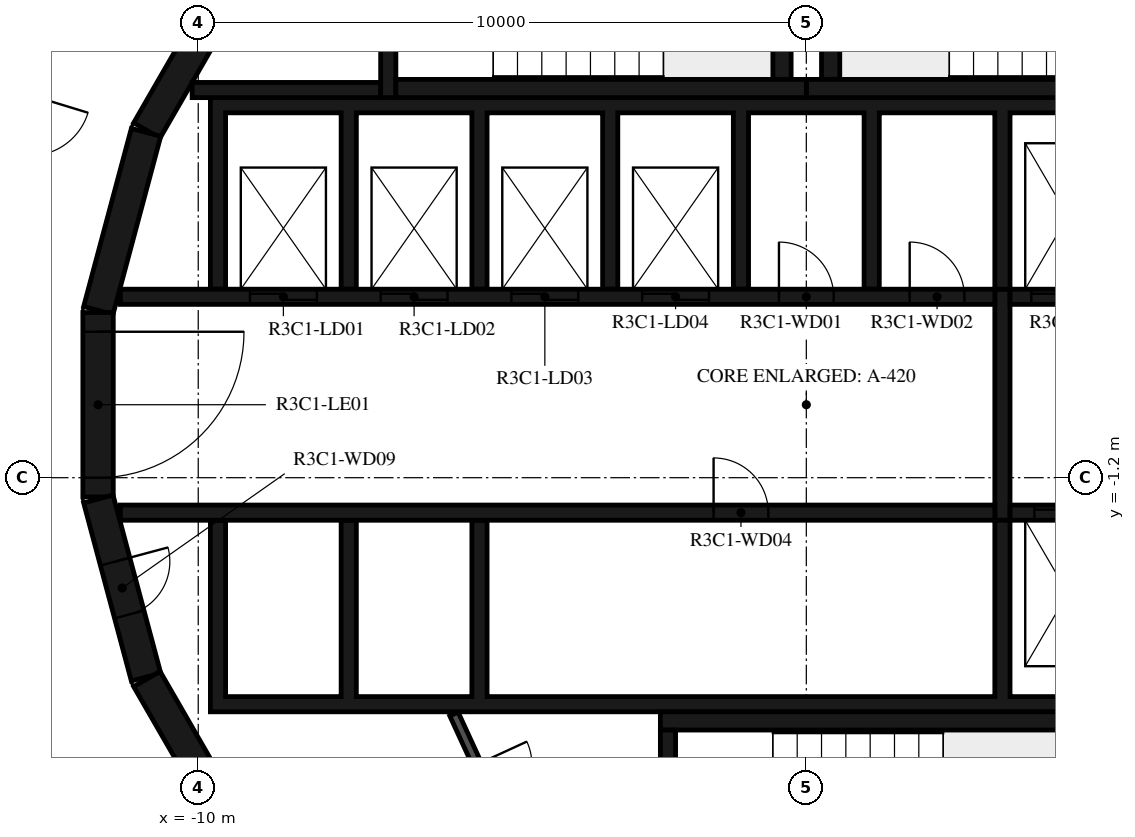
"""IFC4 building model, lengths in metres.
Left out: names, types, materials, properties, quantities, classifications, styles, units other than length and angle.
Written with IfcOpenShell. Run it as: python <this file> out.ifc"""

import sys

from ifc_helpers import new_model, si_unit, direction, frame, frame_2d, origin, place, context, subcontext, project, spatial, polyline, rectangle, outline, extrude, element, fill, save


model = new_model("IFC4")
c1 = context("Model", 3, precision=1e-05, world=origin(), true_north=direction((0.0, 1.0)))
c2 = subcontext(c1, "Body", "Model", "MODEL_VIEW")
j1 = project(units=[si_unit("LENGTHUNIT", "METRE"), si_unit("PLANEANGLEUNIT", "RADIAN")], contexts=[c1])
p1 = place(None, origin())
s1 = spatial("IfcSite", under=j1, at=p1, CompositionType="ELEMENT")
p2 = place(p1, origin())
s2 = spatial("IfcBuilding", under=s1, at=p2, CompositionType="ELEMENT")
p3 = place(p2, frame((0.0, 0.0, 137.9)))
s3 = spatial("IfcBuildingStorey", under=s2, at=p3, CompositionType="ELEMENT", Elevation=137.9)
for number, where, z_axis, x_axis in (
    (1, (-9.329, 7.137, 0.0), (0.0, 0.0, 1.0), (-0.5, -0.866, 0.0)),
    (2, (-10.858, 4.479, 0.0), (0.0, 0.0, 1.0), (-0.259, -0.966, 0.0)),
):
    element("IfcWall", number, at=place(p3, frame(where, z_axis=z_axis, x_axis=x_axis)), inside=s3, PredefinedType="SHEAR", context=c2, shape_type="SweptSolid", body=[
        extrude(rectangle(XDim=3.033, YDim=0.5, at=frame_2d((1.516, 0.0))), origin(), (0.0, 0.0, 1.0), 3.12),
    ])
p4 = place(p3, frame((-11.647, 1.516, 0.0), z_axis=(0.0, 0.0, 1.0), x_axis=(0.0, -1.0, 0.0)))
e3 = element("IfcWall", 3, at=p4, inside=s3, PredefinedType="SHEAR", context=c2, shape_type="SweptSolid", body=[
    extrude(rectangle(XDim=3.033, YDim=0.5, at=frame_2d((1.516, 0.0))), origin(), (0.0, 0.0, 1.0), 3.12),
])
p5 = place(p4, frame((0.316, 0.0, 0.0)))
e4 = element("IfcOpeningElement", 4, at=p5, cuts=e3, PredefinedType="OPENING", context=c2, shape_type="SweptSolid", body=[
    extrude(rectangle(XDim=2.4, YDim=2.1, at=frame_2d((1.2, 1.05))), frame((0.0, 0.26, 0.0), z_axis=(0.0, -1.0, 0.0), x_axis=(1.0, 0.0, 0.0)), (0.0, 0.0, 1.0), 0.52),
])
p6 = place(p3, frame((-11.643, -1.55, 0.0), z_axis=(0.0, 0.0, 1.0), x_axis=(0.258734743916, -0.965948410781, 0.0)))
e5 = element("IfcWall", 5, at=p6, inside=s3, PredefinedType="SHEAR", context=c2, shape_type="SweptSolid", body=[
    extrude(rectangle(XDim=3.033, YDim=0.5, at=frame_2d((1.516, 0.0))), origin(), (0.0, 0.0, 1.0), 3.12),
])
p7 = place(p6, frame((1.066, 0.0, 0.0)))
e6 = element("IfcOpeningElement", 6, at=p7, cuts=e5, PredefinedType="OPENING", context=c2, shape_type="SweptSolid", body=[
    extrude(rectangle(XDim=0.9, YDim=2.1, at=frame_2d((0.45, 1.05))), frame((0.0, 0.26, 0.0), z_axis=(0.0, -1.0, 0.0), x_axis=(1.0, 0.0, 0.0)), (0.0, 0.0, 1.0), 0.52),
])
p8 = place(p3, frame((-10.845, -4.51, 0.0), z_axis=(0.0, 0.0, 1.0), x_axis=(0.500087131594, -0.865975092491, 0.0)))
e7 = element("IfcWall", 7, at=p8, inside=s3, PredefinedType="SHEAR", context=c2, shape_type="SweptSolid", body=[
    extrude(rectangle(XDim=3.033, YDim=0.5, at=frame_2d((1.516, 0.0))), origin(), (0.0, 0.0, 1.0), 3.12),
])
p9 = place(p3, frame((0.0, 5.2, 0.0), z_axis=(0.0, 0.0, 1.0), x_axis=(1.0, 0.0, 0.0)))
e8 = element("IfcWall", 8, at=p9, inside=s3, PredefinedType="SHEAR", context=c2, shape_type="SweptSolid", body=[
    extrude(rectangle(XDim=6.75, YDim=0.3, at=frame_2d((3.375, 0.0))), origin(), (0.0, 0.0, 1.0), 3.12),
])
p10 = place(p3, frame((0.4, 5.35, 0.0), z_axis=(0.0, 0.0, 1.0), x_axis=(0.0, 1.0, 0.0)))
e9 = element("IfcWall", 9, at=p10, inside=s3, PredefinedType="SHEAR", context=c2, shape_type="SweptSolid", body=[
    extrude(rectangle(XDim=3.32, YDim=0.3, at=frame_2d((1.66, 0.0))), origin(), (0.0, 0.0, 1.0), 3.12),
])
p11 = place(p3, frame((-6.75, 5.2, 0.0), z_axis=(0.0, 0.0, 1.0), x_axis=(1.0, 0.0, 0.0)))
e10 = element("IfcWall", 10, at=p11, inside=s3, PredefinedType="SHEAR", context=c2, shape_type="SweptSolid", body=[
    extrude(rectangle(XDim=6.75, YDim=0.3, at=frame_2d((3.375, 0.0))), origin(), (0.0, 0.0, 1.0), 3.12),
])
p12 = place(p3, frame((-0.4, 5.35, 0.0), z_axis=(0.0, 0.0, 1.0), x_axis=(0.0, 1.0, 0.0)))
e11 = element("IfcWall", 11, at=p12, inside=s3, PredefinedType="SHEAR", context=c2, shape_type="SweptSolid", body=[
    extrude(rectangle(XDim=3.32, YDim=0.3, at=frame_2d((1.66, 0.0))), origin(), (0.0, 0.0, 1.0), 3.12),
])
p13 = place(p3, frame((-6.875, 8.97, 0.0), z_axis=(0.0, 0.0, 1.0), x_axis=(0.0, -1.0, 0.0)))
e12 = element("IfcWall", 12, at=p13, inside=s3, PredefinedType="SHEAR", context=c2, shape_type="SweptSolid", body=[
    extrude(rectangle(XDim=3.92, YDim=0.25, at=frame_2d((1.96, 0.0))), origin(), (0.0, 0.0, 1.0), 3.12),
])
p14 = place(p13, frame((1.61, 0.0, 0.0)))
e13 = element("IfcOpeningElement", 13, at=p14, cuts=e12, PredefinedType="OPENING", context=c2, shape_type="SweptSolid", body=[
    extrude(rectangle(XDim=1.2, YDim=2.1, at=frame_2d((0.6, 1.05))), frame((0.0, 0.135, 0.0), z_axis=(0.0, -1.0, 0.0), x_axis=(1.0, 0.0, 0.0)), (0.0, 0.0, 1.0), 0.27),
])
p15 = place(p3, frame((-7.0, 5.175, 0.0), z_axis=(0.0, 0.0, 1.0), x_axis=(-1.0, 0.0, 0.0)))
e14 = element("IfcWall", 14, at=p15, inside=s3, PredefinedType="SHEAR", context=c2, shape_type="SweptSolid", body=[
    extrude(rectangle(XDim=3.1, YDim=0.25, at=frame_2d((1.55, 0.0))), origin(), (0.0, 0.0, 1.0), 3.12),
])
p16 = place(p3, frame((-2.275, -8.67, 0.0), z_axis=(0.0, 0.0, 1.0), x_axis=(0.0, 1.0, 0.0)))
e15 = element("IfcWall", 15, at=p16, inside=s3, PredefinedType="SHEAR", context=c2, shape_type="SweptSolid", body=[
    extrude(rectangle(XDim=3.32, YDim=0.25, at=frame_2d((1.66, 0.0))), origin(), (0.0, 0.0, 1.0), 3.12),
])
p17 = place(p3, frame((-2.4, -5.2, 0.0), z_axis=(0.0, 0.0, 1.0), x_axis=(1.0, 0.0, 0.0)))
e16 = element("IfcWall", 16, at=p17, inside=s3, PredefinedType="SHEAR", context=c2, shape_type="SweptSolid", body=[
    extrude(rectangle(XDim=7.05, YDim=0.3, at=frame_2d((3.525, 0.0))), origin(), (0.0, 0.0, 1.0), 3.12),
])
p18 = place(p3, origin())
e17 = element("IfcWall", 17, at=p18, inside=s3, PredefinedType="SHEAR", context=c2, shape_type="SweptSolid", body=[
    extrude(outline(polyline([(-9.55, 4.8), (-7.65, 4.8), (-7.65, 1.9), (-7.4, 1.9), (-7.4, 4.8), (-5.5, 4.8), (-5.5, 1.9), (-5.25, 1.9), (-5.25, 4.8), (-3.35, 4.8), (-3.35, 1.9), (-3.1, 1.9), (-3.1, 4.8), (-1.2, 4.8), (-1.2, 1.9), (-0.95, 1.9), (-0.95, 4.8), (0.95, 4.8), (0.95, 1.9), (1.2, 1.9), (1.2, 4.8), (3.1, 4.8), (3.1, 1.9), (3.35, 1.9), (3.35, 4.8), (5.25, 4.8), (5.25, 1.9), (5.5, 1.9), (5.5, 4.8), (7.4, 4.8), (7.4, 1.9), (7.65, 1.9), (7.65, 4.8), (9.55, 4.8), (9.55, 1.9), (9.8, 1.9), (9.8, 4.8), (9.8, 5.05), (-9.8, 5.05), (-9.8, 4.8), (-9.8, 1.9), (-9.55, 1.9), (-9.55, 4.8)])), origin(), (0.0, 0.0, 1.0), 3.12),
])
p19 = place(p3, origin())
e18 = element("IfcWall", 18, at=p19, inside=s3, PredefinedType="SHEAR", context=c2, shape_type="SweptSolid", body=[
    extrude(outline(polyline([(9.8, -5.05), (9.8, -4.8), (9.8, -1.9), (9.55, -1.9), (9.55, -4.8), (7.65, -4.8), (7.65, -1.9), (7.4, -1.9), (7.4, -4.8), (5.5, -4.8), (5.5, -1.9), (5.25, -1.9), (5.25, -4.8), (3.35, -4.8), (3.35, -1.9), (3.1, -1.9), (3.1, -4.8), (-5.25, -4.8), (-5.25, -1.9), (-5.5, -1.9), (-5.5, -4.8), (-7.4, -4.8), (-7.4, -1.9), (-7.65, -1.9), (-7.65, -4.8), (-9.55, -4.8), (-9.55, -1.9), (-9.8, -1.9), (-9.8, -4.8), (-9.8, -5.05), (9.8, -5.05)])), origin(), (0.0, 0.0, 1.0), 3.12),
])
p20 = place(p3, frame((-11.28, 1.775, 0.0), z_axis=(0.0, 0.0, 1.0), x_axis=(1.0, 0.0, 0.0)))
e19 = element("IfcWall", 19, at=p20, inside=s3, PredefinedType="SHEAR", context=c2, shape_type="SweptSolid", body=[
    extrude(rectangle(XDim=14.38, YDim=0.25, at=frame_2d((7.19, 0.0))), origin(), (0.0, 0.0, 1.0), 3.12),
])
p21 = place(p20, frame((2.13, 0.0, 0.0)))
e20 = element("IfcOpeningElement", 20, at=p21, cuts=e19, PredefinedType="OPENING", context=c2, shape_type="SweptSolid", body=[
    extrude(rectangle(XDim=1.1, YDim=2.1, at=frame_2d((0.55, 1.05))), frame((0.0, 0.135, 0.0), z_axis=(0.0, -1.0, 0.0), x_axis=(1.0, 0.0, 0.0)), (0.0, 0.0, 1.0), 0.27),
])
p22 = place(p20, frame((4.28, 0.0, 0.0)))
e21 = element("IfcOpeningElement", 21, at=p22, cuts=e19, PredefinedType="OPENING", context=c2, shape_type="SweptSolid", body=[
    extrude(rectangle(XDim=1.1, YDim=2.1, at=frame_2d((0.55, 1.05))), frame((0.0, 0.135, 0.0), z_axis=(0.0, -1.0, 0.0), x_axis=(1.0, 0.0, 0.0)), (0.0, 0.0, 1.0), 0.27),
])
p23 = place(p20, frame((6.43, 0.0, 0.0)))
e22 = element("IfcOpeningElement", 22, at=p23, cuts=e19, PredefinedType="OPENING", context=c2, shape_type="SweptSolid", body=[
    extrude(rectangle(XDim=1.1, YDim=2.1, at=frame_2d((0.55, 1.05))), frame((0.0, 0.135, 0.0), z_axis=(0.0, -1.0, 0.0), x_axis=(1.0, 0.0, 0.0)), (0.0, 0.0, 1.0), 0.27),
])
p24 = place(p20, frame((8.58, 0.0, 0.0)))
e23 = element("IfcOpeningElement", 23, at=p24, cuts=e19, PredefinedType="OPENING", context=c2, shape_type="SweptSolid", body=[
    extrude(rectangle(XDim=1.1, YDim=2.1, at=frame_2d((0.55, 1.05))), frame((0.0, 0.135, 0.0), z_axis=(0.0, -1.0, 0.0), x_axis=(1.0, 0.0, 0.0)), (0.0, 0.0, 1.0), 0.27),
])
p25 = place(p20, frame((10.83, 0.0, 0.0)))
e24 = element("IfcOpeningElement", 24, at=p25, cuts=e19, PredefinedType="OPENING", context=c2, shape_type="SweptSolid", body=[
    extrude(rectangle(XDim=0.9, YDim=2.1, at=frame_2d((0.45, 1.05))), frame((0.0, 0.135, 0.0), z_axis=(0.0, -1.0, 0.0), x_axis=(1.0, 0.0, 0.0)), (0.0, 0.0, 1.0), 0.27),
])
p26 = place(p20, frame((12.98, 0.0, 0.0)))
e25 = element("IfcOpeningElement", 25, at=p26, cuts=e19, PredefinedType="OPENING", context=c2, shape_type="SweptSolid", body=[
    extrude(rectangle(XDim=0.9, YDim=2.1, at=frame_2d((0.45, 1.05))), frame((0.0, 0.135, 0.0), z_axis=(0.0, -1.0, 0.0), x_axis=(1.0, 0.0, 0.0)), (0.0, 0.0, 1.0), 0.27),
])
p27 = place(p3, frame((3.35, 1.775, 0.0), z_axis=(0.0, 0.0, 1.0), x_axis=(1.0, 0.0, 0.0)))
e26 = element("IfcWall", 26, at=p27, inside=s3, PredefinedType="SHEAR", context=c2, shape_type="SweptSolid", body=[
    extrude(rectangle(XDim=7.93, YDim=0.25, at=frame_2d((3.965, 0.0))), origin(), (0.0, 0.0, 1.0), 3.12),
])
p28 = place(p27, frame((0.35, 0.0, 0.0)))
e27 = element("IfcOpeningElement", 27, at=p28, cuts=e26, PredefinedType="OPENING", context=c2, shape_type="SweptSolid", body=[
    extrude(rectangle(XDim=1.2, YDim=2.4, at=frame_2d((0.6, 1.2))), frame((0.0, 0.135, 0.0), z_axis=(0.0, -1.0, 0.0), x_axis=(1.0, 0.0, 0.0)), (0.0, 0.0, 1.0), 0.27),
])
p29 = place(p27, frame((2.5, 0.0, 0.0)))
e28 = element("IfcOpeningElement", 28, at=p29, cuts=e26, PredefinedType="OPENING", context=c2, shape_type="SweptSolid", body=[
    extrude(rectangle(XDim=1.2, YDim=2.4, at=frame_2d((0.6, 1.2))), frame((0.0, 0.135, 0.0), z_axis=(0.0, -1.0, 0.0), x_axis=(1.0, 0.0, 0.0)), (0.0, 0.0, 1.0), 0.27),
])
p30 = place(p27, frame((4.8, 0.0, 0.0)))
e29 = element("IfcOpeningElement", 29, at=p30, cuts=e26, PredefinedType="OPENING", context=c2, shape_type="SweptSolid", body=[
    extrude(rectangle(XDim=0.9, YDim=2.1, at=frame_2d((0.45, 1.05))), frame((0.0, 0.135, 0.0), z_axis=(0.0, -1.0, 0.0), x_axis=(1.0, 0.0, 0.0)), (0.0, 0.0, 1.0), 0.27),
])
p31 = place(p3, frame((-11.28, -1.775, 0.0), z_axis=(0.0, 0.0, 1.0), x_axis=(1.0, 0.0, 0.0)))
e30 = element("IfcWall", 30, at=p31, inside=s3, PredefinedType="SHEAR", context=c2, shape_type="SweptSolid", body=[
    extrude(rectangle(XDim=14.38, YDim=0.25, at=frame_2d((7.19, 0.0))), origin(), (0.0, 0.0, 1.0), 3.12),
])
p32 = place(p31, frame((9.755, 0.0, 0.0)))
e31 = element("IfcOpeningElement", 31, at=p32, cuts=e30, PredefinedType="OPENING", context=c2, shape_type="SweptSolid", body=[
    extrude(rectangle(XDim=0.9, YDim=2.1, at=frame_2d((0.45, 1.05))), frame((0.0, 0.135, 0.0), z_axis=(0.0, -1.0, 0.0), x_axis=(1.0, 0.0, 0.0)), (0.0, 0.0, 1.0), 0.27),
])
p33 = place(p3, frame((3.35, -1.775, 0.0), z_axis=(0.0, 0.0, 1.0), x_axis=(1.0, 0.0, 0.0)))
e32 = element("IfcWall", 32, at=p33, inside=s3, PredefinedType="SHEAR", context=c2, shape_type="SweptSolid", body=[
    extrude(rectangle(XDim=7.93, YDim=0.25, at=frame_2d((3.965, 0.0))), origin(), (0.0, 0.0, 1.0), 3.12),
])
p34 = place(p33, frame((0.4, 0.0, 0.0)))
e33 = element("IfcOpeningElement", 33, at=p34, cuts=e32, PredefinedType="OPENING", context=c2, shape_type="SweptSolid", body=[
    extrude(rectangle(XDim=1.1, YDim=2.4, at=frame_2d((0.55, 1.2))), frame((0.0, 0.135, 0.0), z_axis=(0.0, -1.0, 0.0), x_axis=(1.0, 0.0, 0.0)), (0.0, 0.0, 1.0), 0.27),
])
p35 = place(p33, frame((2.55, 0.0, 0.0)))
e34 = element("IfcOpeningElement", 34, at=p35, cuts=e32, PredefinedType="OPENING", context=c2, shape_type="SweptSolid", body=[
    extrude(rectangle(XDim=1.1, YDim=2.4, at=frame_2d((0.55, 1.2))), frame((0.0, 0.135, 0.0), z_axis=(0.0, -1.0, 0.0), x_axis=(1.0, 0.0, 0.0)), (0.0, 0.0, 1.0), 0.27),
])
p36 = place(p33, frame((4.7, 0.0, 0.0)))
e35 = element("IfcOpeningElement", 35, at=p36, cuts=e32, PredefinedType="OPENING", context=c2, shape_type="SweptSolid", body=[
    extrude(rectangle(XDim=1.1, YDim=2.4, at=frame_2d((0.55, 1.2))), frame((0.0, 0.135, 0.0), z_axis=(0.0, -1.0, 0.0), x_axis=(1.0, 0.0, 0.0)), (0.0, 0.0, 1.0), 0.27),
])
p37 = place(p3, frame((3.225, -1.9, 0.0), z_axis=(0.0, 0.0, 1.0), x_axis=(0.0, 1.0, 0.0)))
e36 = element("IfcWall", 36, at=p37, inside=s3, PredefinedType="SHEAR", context=c2, shape_type="SweptSolid", body=[
    extrude(rectangle(XDim=3.8, YDim=0.25, at=frame_2d((1.9, 0.0))), origin(), (0.0, 0.0, 1.0), 3.12),
])
p38 = place(p3, frame((-5.795, -5.086, 0.0), z_axis=(0.0, 0.0, 1.0), x_axis=(0.417887867606, -0.908498613157, 0.0)))
e37 = element("IfcWall", 37, at=p38, inside=s3, PredefinedType="PARTITIONING", context=c2, shape_type="SweptSolid", body=[
    extrude(rectangle(XDim=2.726, YDim=0.15, at=frame_2d((1.363, 0.0))), origin(), (0.0, 0.0, 1.0), 3.12),
])
p39 = place(p38, frame((0.913, 0.0, 0.0)))
e38 = element("IfcOpeningElement", 38, at=p39, cuts=e37, PredefinedType="OPENING", context=c2, shape_type="SweptSolid", body=[
    extrude(rectangle(XDim=0.9, YDim=2.1, at=frame_2d((0.45, 1.05))), frame((0.0, 0.085, 0.0), z_axis=(0.0, -1.0, 0.0), x_axis=(1.0, 0.0, 0.0)), (0.0, 0.0, 1.0), 0.17),
])
p40 = place(p3, frame((-12.028, 7.516, 0.0), z_axis=(0.0, 0.0, 1.0), x_axis=(-0.292365533182, -0.956306642771, 0.0)))
e39 = element("IfcWall", 39, at=p40, inside=s3, PredefinedType="STANDARD", context=c2, shape_type="SweptSolid", body=[
    extrude(rectangle(XDim=7.342, YDim=0.2, at=frame_2d((3.671, 0.0))), origin(), (0.0, 0.0, 1.0), 3.12),
])
p41 = place(p40, frame((2.533, 0.0, 0.0)))
e40 = element("IfcOpeningElement", 40, at=p41, cuts=e39, PredefinedType="OPENING", context=c2, shape_type="SweptSolid", body=[
    extrude(rectangle(XDim=1.0, YDim=2.1, at=frame_2d((0.5, 1.05))), frame((0.0, 0.11, 0.0), z_axis=(0.0, -1.0, 0.0), x_axis=(1.0, 0.0, 0.0)), (0.0, 0.0, 1.0), 0.22),
])
p42 = place(p5, origin())
e41 = element("IfcDoor", 41, at=p42, inside=s3, OperationType="DOUBLE_DOOR_SINGLE_SWING", PredefinedType="DOOR", context=c2, shape_type="SweptSolid", body=[
    extrude(rectangle(XDim=2.4, YDim=2.1, at=frame_2d((1.2, 1.05))), frame((0.0, 0.025, 0.0), z_axis=(0.0, -1.0, 0.0), x_axis=(1.0, 0.0, 0.0)), (0.0, 0.0, 1.0), 0.05),
])
fill(e4, e41)
p43 = place(p21, origin())
e42 = element("IfcDoor", 42, at=p43, inside=s3, OperationType="DOUBLE_DOOR_SLIDING", PredefinedType="DOOR", context=c2, shape_type="SweptSolid", body=[
    extrude(rectangle(XDim=1.1, YDim=2.1, at=frame_2d((0.55, 1.05))), frame((0.0, 0.025, 0.0), z_axis=(0.0, -1.0, 0.0), x_axis=(1.0, 0.0, 0.0)), (0.0, 0.0, 1.0), 0.05),
])
fill(e20, e42)
p44 = place(p22, origin())
e43 = element("IfcDoor", 43, at=p44, inside=s3, OperationType="DOUBLE_DOOR_SLIDING", PredefinedType="DOOR", context=c2, shape_type="SweptSolid", body=[
    extrude(rectangle(XDim=1.1, YDim=2.1, at=frame_2d((0.55, 1.05))), frame((0.0, 0.025, 0.0), z_axis=(0.0, -1.0, 0.0), x_axis=(1.0, 0.0, 0.0)), (0.0, 0.0, 1.0), 0.05),
])
fill(e21, e43)
p45 = place(p23, origin())
e44 = element("IfcDoor", 44, at=p45, inside=s3, OperationType="DOUBLE_DOOR_SLIDING", PredefinedType="DOOR", context=c2, shape_type="SweptSolid", body=[
    extrude(rectangle(XDim=1.1, YDim=2.1, at=frame_2d((0.55, 1.05))), frame((0.0, 0.025, 0.0), z_axis=(0.0, -1.0, 0.0), x_axis=(1.0, 0.0, 0.0)), (0.0, 0.0, 1.0), 0.05),
])
fill(e22, e44)
p46 = place(p24, origin())
e45 = element("IfcDoor", 45, at=p46, inside=s3, OperationType="DOUBLE_DOOR_SLIDING", PredefinedType="DOOR", context=c2, shape_type="SweptSolid", body=[
    extrude(rectangle(XDim=1.1, YDim=2.1, at=frame_2d((0.55, 1.05))), frame((0.0, 0.025, 0.0), z_axis=(0.0, -1.0, 0.0), x_axis=(1.0, 0.0, 0.0)), (0.0, 0.0, 1.0), 0.05),
])
fill(e23, e45)
p47 = place(p28, origin())
e46 = element("IfcDoor", 46, at=p47, inside=s3, OperationType="DOUBLE_DOOR_SLIDING", PredefinedType="DOOR", context=c2, shape_type="SweptSolid", body=[
    extrude(rectangle(XDim=1.2, YDim=2.4, at=frame_2d((0.6, 1.2))), frame((0.0, 0.025, 0.0), z_axis=(0.0, -1.0, 0.0), x_axis=(1.0, 0.0, 0.0)), (0.0, 0.0, 1.0), 0.05),
])
fill(e27, e46)
p48 = place(p34, origin())
e47 = element("IfcDoor", 47, at=p48, inside=s3, OperationType="DOUBLE_DOOR_SLIDING", PredefinedType="DOOR", context=c2, shape_type="SweptSolid", body=[
    extrude(rectangle(XDim=1.1, YDim=2.4, at=frame_2d((0.55, 1.2))), frame((0.0, 0.025, 0.0), z_axis=(0.0, -1.0, 0.0), x_axis=(1.0, 0.0, 0.0)), (0.0, 0.0, 1.0), 0.05),
])
fill(e33, e47)
p49 = place(p25, origin())
e48 = element("IfcDoor", 48, at=p49, inside=s3, OperationType="SINGLE_SWING_RIGHT", PredefinedType="DOOR", context=c2, shape_type="SweptSolid", body=[
    extrude(rectangle(XDim=0.9, YDim=2.1, at=frame_2d((0.45, 1.05))), frame((0.0, 0.025, 0.0), z_axis=(0.0, -1.0, 0.0), x_axis=(1.0, 0.0, 0.0)), (0.0, 0.0, 1.0), 0.05),
])
fill(e24, e48)
p50 = place(p26, origin())
e49 = element("IfcDoor", 49, at=p50, inside=s3, OperationType="SINGLE_SWING_LEFT", PredefinedType="DOOR", context=c2, shape_type="SweptSolid", body=[
    extrude(rectangle(XDim=0.9, YDim=2.1, at=frame_2d((0.45, 1.05))), frame((0.0, 0.025, 0.0), z_axis=(0.0, -1.0, 0.0), x_axis=(1.0, 0.0, 0.0)), (0.0, 0.0, 1.0), 0.05),
])
fill(e25, e49)
p51 = place(p32, origin())
e50 = element("IfcDoor", 50, at=p51, inside=s3, OperationType="SINGLE_SWING_LEFT", PredefinedType="DOOR", context=c2, shape_type="SweptSolid", body=[
    extrude(rectangle(XDim=0.9, YDim=2.1, at=frame_2d((0.45, 1.05))), frame((0.0, 0.025, 0.0), z_axis=(0.0, -1.0, 0.0), x_axis=(1.0, 0.0, 0.0)), (0.0, 0.0, 1.0), 0.05),
])
fill(e31, e50)
p52 = place(p7, origin())
e51 = element("IfcDoor", 51, at=p52, inside=s3, OperationType="SINGLE_SWING_RIGHT", PredefinedType="DOOR", context=c2, shape_type="SweptSolid", body=[
    extrude(rectangle(XDim=0.9, YDim=2.1, at=frame_2d((0.45, 1.05))), frame((0.0, 0.025, 0.0), z_axis=(0.0, -1.0, 0.0), x_axis=(1.0, 0.0, 0.0)), (0.0, 0.0, 1.0), 0.05),
])
fill(e6, e51)
save(model, sys.argv[1])
